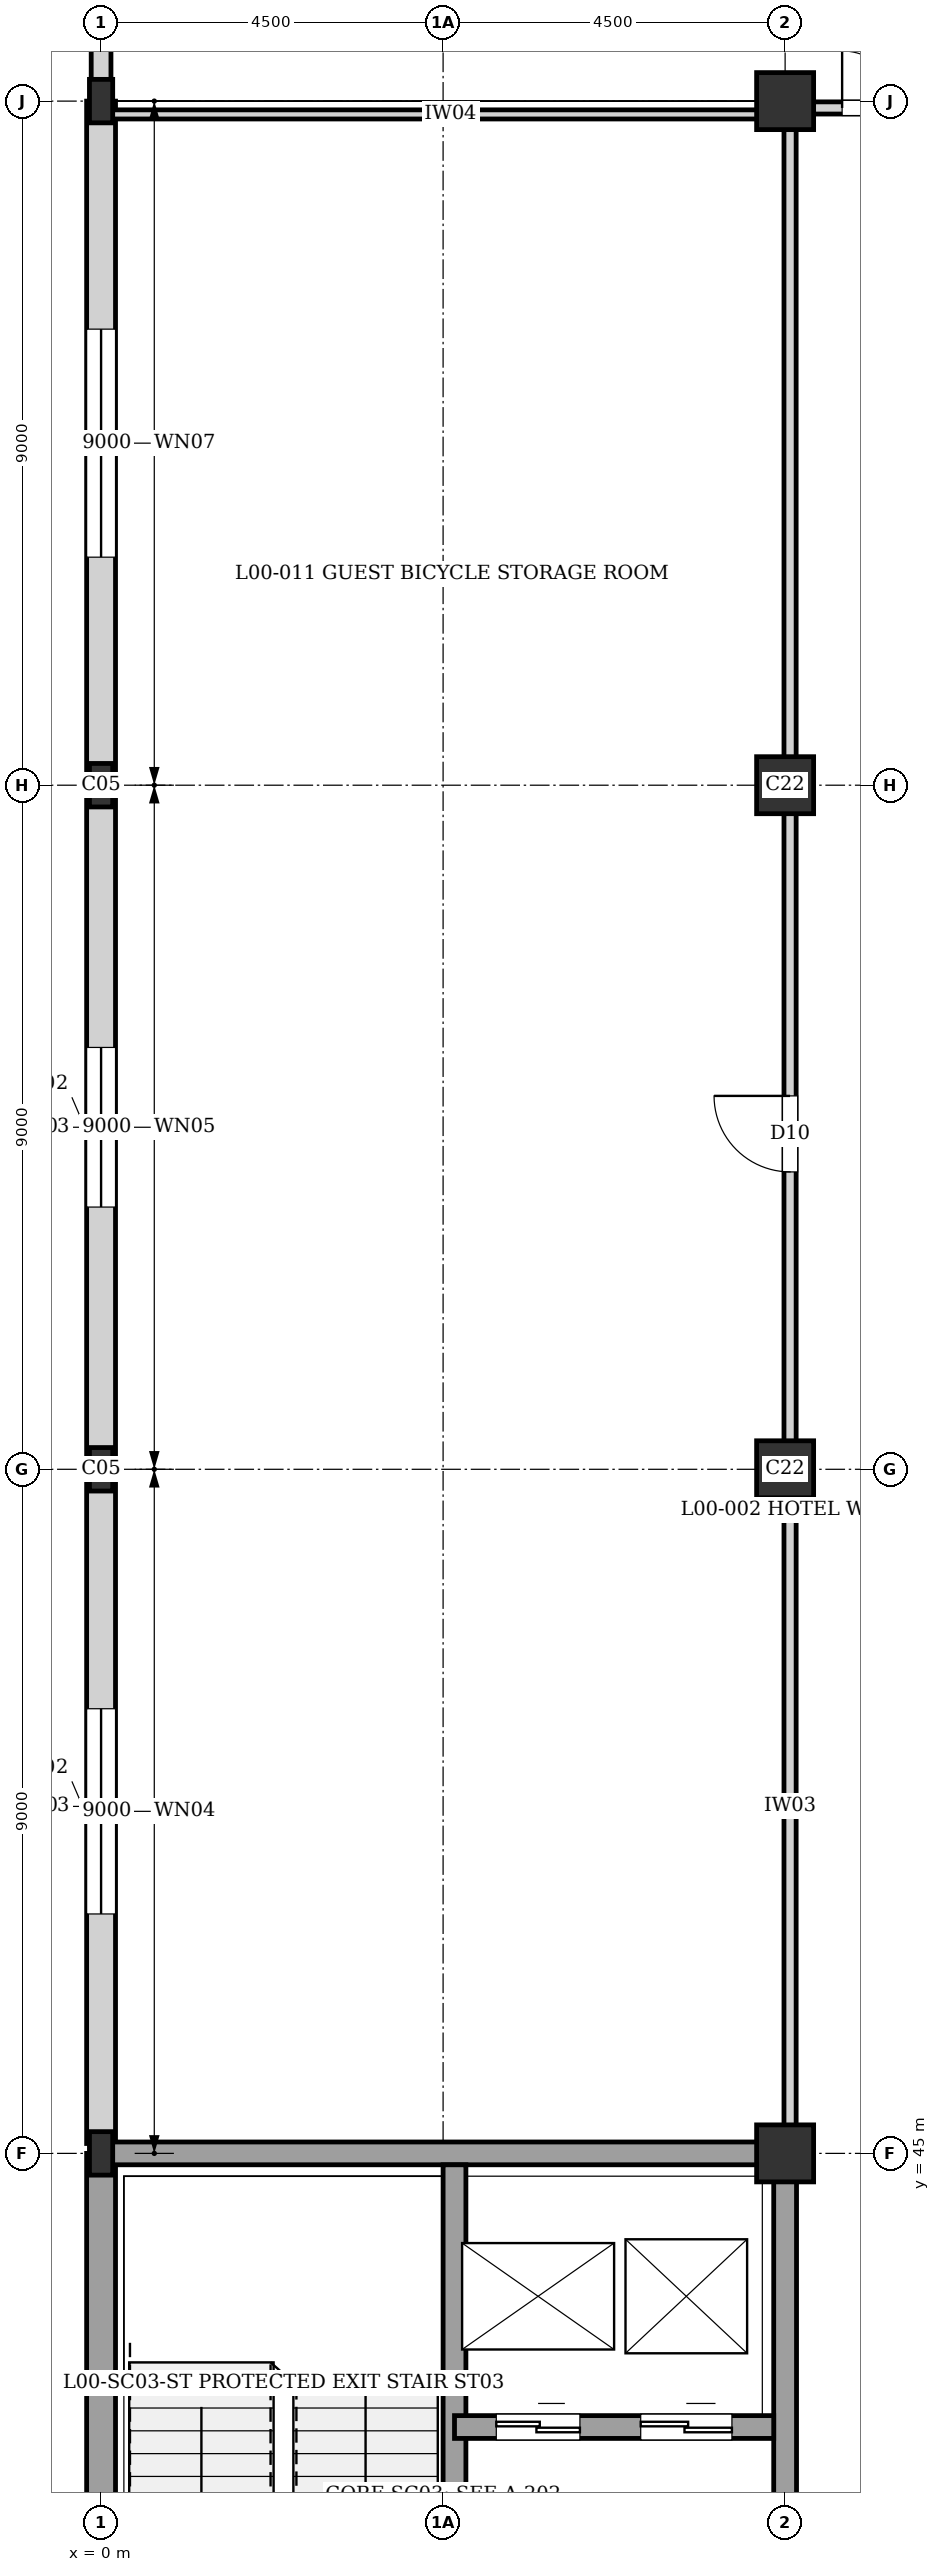
"""IFC4 building model, lengths in metres.
Left out: names, types, materials, properties, quantities, classifications, styles, units other than length and angle.
Written with IfcOpenShell. Run it as: python <this file> out.ifc"""

import sys

from ifc_helpers import new_model, si_unit, direction, frame, frame_2d, origin, origin_2d, place, context, subcontext, project, spatial, rectangle, i_section, extrude, element, fill, save


model = new_model("IFC4")
c1 = context("Model", 3, precision=1e-05, world=origin(), true_north=direction((0.0, 1.0)))
c2 = subcontext(c1, "Body", "Model", "MODEL_VIEW")
j1 = project(units=[si_unit("LENGTHUNIT", "METRE"), si_unit("PLANEANGLEUNIT", "RADIAN")], contexts=[c1])
p1 = place(None, origin())
s1 = spatial("IfcSite", under=j1, at=p1, CompositionType="ELEMENT")
p2 = place(p1, origin())
s2 = spatial("IfcBuilding", under=s1, at=p2, CompositionType="ELEMENT")
p3 = place(p2, origin())
s3 = spatial("IfcBuildingStorey", under=s2, at=p3, CompositionType="ELEMENT", Elevation=0.0)
for number, where, z_axis, x_axis in (
    (1, (0.0, 45.0, 0.0), (0.0, 0.0, 1.0), (1.0, 0.0, 0.0)),
    (2, (0.0, 54.0, 0.0), (0.0, 0.0, 1.0), (1.0, 0.0, 0.0)),
    (3, (0.0, 63.0, 0.0), (0.0, 0.0, 1.0), (1.0, 0.0, 0.0)),
    (4, (0.0, 72.0, 0.0), (0.0, 0.0, 1.0), (1.0, 0.0, 0.0)),
):
    element("IfcColumn", number, at=place(p3, frame(where, z_axis=z_axis, x_axis=x_axis)), inside=s3, PredefinedType="COLUMN", context=c2, shape_type="SweptSolid", body=[
        extrude(i_section(OverallWidth=0.306, OverallDepth=0.572, WebThickness=0.021, FlangeThickness=0.04, at=origin_2d()), origin(), (0.0, 0.0, 1.0), 4.32),
    ])
for number, where, z_axis, x_axis in (
    (5, (9.0, 45.0, 0.0), (0.0, 0.0, 1.0), (1.0, 0.0, 0.0)),
    (6, (9.0, 54.0, 0.0), (0.0, 0.0, 1.0), (1.0, 0.0, 0.0)),
    (7, (9.0, 63.0, 0.0), (0.0, 0.0, 1.0), (1.0, 0.0, 0.0)),
    (8, (9.0, 72.0, 0.0), (0.0, 0.0, 1.0), (1.0, 0.0, 0.0)),
):
    element("IfcColumn", number, at=place(p3, frame(where, z_axis=z_axis, x_axis=x_axis)), inside=s3, PredefinedType="COLUMN", context=c2, shape_type="SweptSolid", body=[
        extrude(rectangle(XDim=0.75, YDim=0.75, at=origin_2d()), origin(), (0.0, 0.0, 1.0), 4.32),
    ])
p4 = place(p3, frame((0.0, 36.0, 0.0), z_axis=(0.0, 0.0, 1.0), x_axis=(0.0, 1.0, 0.0)))
e9 = element("IfcWall", 9, at=p4, inside=s3, PredefinedType="SOLIDWALL", context=c2, shape_type="SweptSolid", body=[
    extrude(rectangle(XDim=9.0, YDim=0.38, at=frame_2d((4.5, 0.0))), origin(), (0.0, 0.0, 1.0), 4.055),
])
p5 = place(p4, frame((0.425, 0.0, 0.0)))
e10 = element("IfcOpeningElement", 10, at=p5, cuts=e9, PredefinedType="OPENING", context=c2, shape_type="SweptSolid", body=[
    extrude(rectangle(XDim=1.8, YDim=2.2, at=frame_2d((0.9, 1.1))), frame((0.0, 0.2, 0.0), z_axis=(0.0, -1.0, 0.0), x_axis=(1.0, 0.0, 0.0)), (0.0, 0.0, 1.0), 0.4),
])
p6 = place(p3, frame((0.0, 45.13, 0.0), z_axis=(0.0, 0.0, 1.0), x_axis=(0.0, 1.0, 0.0)))
e11 = element("IfcWall", 11, at=p6, inside=s3, PredefinedType="SOLIDWALL", context=c2, shape_type="SweptSolid", body=[
    extrude(rectangle(XDim=8.87, YDim=0.38, at=frame_2d((4.435, 0.0))), origin(), (0.0, 0.0, 1.0), 4.055),
])
p7 = place(p6, frame((3.02, 0.0, 0.4)))
e12 = element("IfcOpeningElement", 12, at=p7, cuts=e11, PredefinedType="OPENING", context=c2, shape_type="SweptSolid", body=[
    extrude(rectangle(XDim=2.7, YDim=1.95, at=frame_2d((1.35, 0.975))), frame((0.0, 0.2, 0.0), z_axis=(0.0, -1.0, 0.0), x_axis=(1.0, 0.0, 0.0)), (0.0, 0.0, 1.0), 0.4),
])
p8 = place(p3, frame((0.0, 54.0, 0.0), z_axis=(0.0, 0.0, 1.0), x_axis=(0.0, 1.0, 0.0)))
e13 = element("IfcWall", 13, at=p8, inside=s3, PredefinedType="SOLIDWALL", context=c2, shape_type="SweptSolid", body=[
    extrude(rectangle(XDim=9.0, YDim=0.38, at=frame_2d((4.5, 0.0))), origin(), (0.0, 0.0, 1.0), 3.755),
])
p9 = place(p8, frame((3.45, 0.0, 0.4)))
e14 = element("IfcOpeningElement", 14, at=p9, cuts=e13, PredefinedType="OPENING", context=c2, shape_type="SweptSolid", body=[
    extrude(rectangle(XDim=2.1, YDim=1.95, at=frame_2d((1.05, 0.975))), frame((0.0, 0.2, 0.0), z_axis=(0.0, -1.0, 0.0), x_axis=(1.0, 0.0, 0.0)), (0.0, 0.0, 1.0), 0.4),
])
p10 = place(p3, frame((0.0, 63.0, 0.0), z_axis=(0.0, 0.0, 1.0), x_axis=(0.0, 1.0, 0.0)))
e15 = element("IfcWall", 15, at=p10, inside=s3, PredefinedType="SOLIDWALL", context=c2, shape_type="SweptSolid", body=[
    extrude(rectangle(XDim=9.0, YDim=0.38, at=frame_2d((4.5, 0.0))), origin(), (0.0, 0.0, 1.0), 3.695),
])
p11 = place(p10, frame((3.0, 0.0, 0.4)))
e16 = element("IfcOpeningElement", 16, at=p11, cuts=e15, PredefinedType="OPENING", context=c2, shape_type="SweptSolid", body=[
    extrude(rectangle(XDim=3.0, YDim=2.2, at=frame_2d((1.5, 1.1))), frame((0.0, 0.2, 0.0), z_axis=(0.0, -1.0, 0.0), x_axis=(1.0, 0.0, 0.0)), (0.0, 0.0, 1.0), 0.4),
])
p12 = place(p3, frame((0.0, 72.0, 0.0), z_axis=(0.0, 0.0, 1.0), x_axis=(0.0, 1.0, 0.0)))
e17 = element("IfcWall", 17, at=p12, inside=s3, PredefinedType="SOLIDWALL", context=c2, shape_type="SweptSolid", body=[
    extrude(rectangle(XDim=8.87, YDim=0.26, at=frame_2d((4.435, 0.0))), origin(), (0.0, 0.0, 1.0), 3.655),
])
p13 = place(p12, frame((3.4, 0.0, 0.0)))
e18 = element("IfcOpeningElement", 18, at=p13, cuts=e17, PredefinedType="OPENING", context=c2, shape_type="SweptSolid", body=[
    extrude(rectangle(XDim=2.2, YDim=2.5, at=frame_2d((1.1, 1.25))), frame((0.0, 0.14, 0.0), z_axis=(0.0, -1.0, 0.0), x_axis=(1.0, 0.0, 0.0)), (0.0, 0.0, 1.0), 0.28),
])
p14 = place(p3, frame((9.0, 36.0, 0.0), z_axis=(0.0, 0.0, 1.0), x_axis=(0.0, 1.0, 0.0)))
e19 = element("IfcWall", 19, at=p14, inside=s3, PredefinedType="SHEAR", context=c2, shape_type="SweptSolid", body=[
    extrude(rectangle(XDim=9.0, YDim=0.3, at=frame_2d((4.5, 0.0))), origin(), (0.0, 0.0, 1.0), 4.055),
])
p15 = place(p14, frame((1.95, 0.0, 0.0)))
e20 = element("IfcOpeningElement", 20, at=p15, cuts=e19, PredefinedType="OPENING", context=c2, shape_type="SweptSolid", body=[
    extrude(rectangle(XDim=1.6, YDim=2.1, at=frame_2d((0.8, 1.05))), frame((0.0, 0.16, 0.0), z_axis=(0.0, -1.0, 0.0), x_axis=(1.0, 0.0, 0.0)), (0.0, 0.0, 1.0), 0.32),
])
p16 = place(p3, frame((0.0, 45.0, 0.0), z_axis=(0.0, 0.0, 1.0), x_axis=(1.0, 0.0, 0.0)))
e21 = element("IfcWall", 21, at=p16, inside=s3, PredefinedType="SHEAR", context=c2, shape_type="SweptSolid", body=[
    extrude(rectangle(XDim=9.0, YDim=0.3, at=frame_2d((4.5, 0.0))), origin(), (0.0, 0.0, 1.0), 4.055),
])
p17 = place(p3, frame((4.65, 36.15, 0.0), z_axis=(0.0, 0.0, 1.0), x_axis=(0.0, 1.0, 0.0)))
e22 = element("IfcWall", 22, at=p17, inside=s3, PredefinedType="SHEAR", context=c2, shape_type="SweptSolid", body=[
    extrude(rectangle(XDim=8.7, YDim=0.3, at=frame_2d((4.35, 0.0))), origin(), (0.0, 0.0, 1.0), 4.055),
])
p18 = place(p17, frame((0.35, 0.0, 0.0)))
e23 = element("IfcOpeningElement", 23, at=p18, cuts=e22, PredefinedType="OPENING", context=c2, shape_type="SweptSolid", body=[
    extrude(rectangle(XDim=1.4, YDim=2.02, at=frame_2d((0.7, 1.01))), frame((0.0, 0.16, 0.0), z_axis=(0.0, -1.0, 0.0), x_axis=(1.0, 0.0, 0.0)), (0.0, 0.0, 1.0), 0.32),
])
p19 = place(p3, frame((4.65, 41.4, 0.0), z_axis=(0.0, 0.0, 1.0), x_axis=(1.0, 0.0, 0.0)))
e24 = element("IfcWall", 24, at=p19, inside=s3, PredefinedType="SHEAR", context=c2, shape_type="SweptSolid", body=[
    extrude(rectangle(XDim=4.2, YDim=0.3, at=frame_2d((2.1, 0.0))), origin(), (0.0, 0.0, 1.0), 4.055),
])
p20 = place(p19, frame((0.55, 0.0, 0.0)))
e25 = element("IfcOpeningElement", 25, at=p20, cuts=e24, PredefinedType="OPENING", context=c2, shape_type="SweptSolid", body=[
    extrude(rectangle(XDim=1.1, YDim=2.1, at=frame_2d((0.55, 1.05))), frame((0.0, 0.16, 0.0), z_axis=(0.0, -1.0, 0.0), x_axis=(1.0, 0.0, 0.0)), (0.0, 0.0, 1.0), 0.32),
])
p21 = place(p19, frame((2.45, 0.0, 0.0)))
e26 = element("IfcOpeningElement", 26, at=p21, cuts=e24, PredefinedType="OPENING", context=c2, shape_type="SweptSolid", body=[
    extrude(rectangle(XDim=1.2, YDim=2.2, at=frame_2d((0.6, 1.1))), frame((0.0, 0.16, 0.0), z_axis=(0.0, -1.0, 0.0), x_axis=(1.0, 0.0, 0.0)), (0.0, 0.0, 1.0), 0.32),
])
p22 = place(p3, frame((0.135, 71.825, 0.0), z_axis=(0.0, 0.0, 1.0), x_axis=(1.0, 0.0, 0.0)))
e27 = element("IfcWall", 27, at=p22, inside=s3, PredefinedType="PARTITIONING", context=c2, shape_type="SweptSolid", body=[
    extrude(rectangle(XDim=8.925, YDim=0.12, at=frame_2d((4.462, 0.0))), origin(), (0.0, 0.0, 1.0), 4.055),
])
p23 = place(p3, frame((9.065, 45.155, 0.0), z_axis=(0.0, 0.0, 1.0), x_axis=(0.0, 1.0, 0.0)))
e28 = element("IfcWall", 28, at=p23, inside=s3, PredefinedType="PARTITIONING", context=c2, shape_type="SweptSolid", body=[
    extrude(rectangle(XDim=8.825, YDim=0.16, at=frame_2d((4.413, 0.0))), origin(), (0.0, 0.0, 1.0), 3.725),
])
p24 = place(p3, frame((9.22, 71.91, 0.0), z_axis=(0.0, 0.0, 1.0), x_axis=(1.0, 0.0, 0.0)))
e29 = element("IfcWall", 29, at=p24, inside=s3, PredefinedType="PARTITIONING", context=c2, shape_type="SweptSolid", body=[
    extrude(rectangle(XDim=2.56, YDim=0.16, at=frame_2d((1.28, 0.0))), origin(), (0.0, 0.0, 1.0), 3.655),
])
p25 = place(p24, frame((0.53, 0.0, 0.0)))
e30 = element("IfcOpeningElement", 30, at=p25, cuts=e29, PredefinedType="OPENING", context=c2, shape_type="SweptSolid", body=[
    extrude(rectangle(XDim=1.5, YDim=2.1, at=frame_2d((0.75, 1.05))), frame((0.0, 0.09, 0.0), z_axis=(0.0, -1.0, 0.0), x_axis=(1.0, 0.0, 0.0)), (0.0, 0.0, 1.0), 0.18),
])
p26 = place(p3, frame((9.065, 53.98, 0.0), z_axis=(0.0, 0.0, 1.0), x_axis=(0.0, 1.0, 0.0)))
e31 = element("IfcWall", 31, at=p26, inside=s3, PredefinedType="PARTITIONING", context=c2, shape_type="SweptSolid", body=[
    extrude(rectangle(XDim=9.0, YDim=0.16, at=frame_2d((4.5, 0.0))), origin(), (0.0, 0.0, 1.0), 3.665),
])
p27 = place(p26, frame((3.933, 0.0, 0.0)))
e32 = element("IfcOpeningElement", 32, at=p27, cuts=e31, PredefinedType="OPENING", context=c2, shape_type="SweptSolid", body=[
    extrude(rectangle(XDim=1.0, YDim=2.1, at=frame_2d((0.5, 1.05))), frame((0.0, 0.09, 0.0), z_axis=(0.0, -1.0, 0.0), x_axis=(1.0, 0.0, 0.0)), (0.0, 0.0, 1.0), 0.18),
])
p28 = place(p3, frame((9.065, 62.98, 0.0), z_axis=(0.0, 0.0, 1.0), x_axis=(0.0, 1.0, 0.0)))
e33 = element("IfcWall", 33, at=p28, inside=s3, PredefinedType="PARTITIONING", context=c2, shape_type="SweptSolid", body=[
    extrude(rectangle(XDim=8.69, YDim=0.16, at=frame_2d((4.345, 0.0))), origin(), (0.0, 0.0, 1.0), 3.615),
])
p29 = place(p7, origin())
e34 = element("IfcWindow", 34, at=p29, inside=s3, PartitioningType="SINGLE_PANEL", PredefinedType="WINDOW", context=c2, shape_type="SweptSolid", body=[
    extrude(rectangle(XDim=2.7, YDim=1.95, at=frame_2d((1.35, 0.975))), frame((0.0, 0.03, 0.0), z_axis=(0.0, -1.0, 0.0), x_axis=(1.0, 0.0, 0.0)), (0.0, 0.0, 1.0), 0.06),
])
fill(e12, e34)
p30 = place(p9, origin())
e35 = element("IfcWindow", 35, at=p30, inside=s3, PartitioningType="SINGLE_PANEL", PredefinedType="WINDOW", context=c2, shape_type="SweptSolid", body=[
    extrude(rectangle(XDim=2.1, YDim=1.95, at=frame_2d((1.05, 0.975))), frame((0.0, 0.03, 0.0), z_axis=(0.0, -1.0, 0.0), x_axis=(1.0, 0.0, 0.0)), (0.0, 0.0, 1.0), 0.06),
])
fill(e14, e35)
p31 = place(p11, origin())
e36 = element("IfcWindow", 36, at=p31, inside=s3, PartitioningType="SINGLE_PANEL", PredefinedType="WINDOW", context=c2, shape_type="SweptSolid", body=[
    extrude(rectangle(XDim=3.0, YDim=2.2, at=frame_2d((1.5, 1.1))), frame((0.0, 0.03, 0.0), z_axis=(0.0, -1.0, 0.0), x_axis=(1.0, 0.0, 0.0)), (0.0, 0.0, 1.0), 0.06),
])
fill(e16, e36)
p32 = place(p20, origin())
e37 = element("IfcDoor", 37, at=p32, inside=s3, OperationType="DOUBLE_DOOR_SLIDING", PredefinedType="DOOR", context=c2, shape_type="SweptSolid", body=[
    extrude(rectangle(XDim=1.1, YDim=2.1, at=frame_2d((0.55, 1.05))), frame((0.0, 0.025, 0.0), z_axis=(0.0, -1.0, 0.0), x_axis=(1.0, 0.0, 0.0)), (0.0, 0.0, 1.0), 0.05),
])
fill(e25, e37)
p33 = place(p21, origin())
e38 = element("IfcDoor", 38, at=p33, inside=s3, OperationType="DOUBLE_DOOR_SLIDING", PredefinedType="DOOR", context=c2, shape_type="SweptSolid", body=[
    extrude(rectangle(XDim=1.2, YDim=2.2, at=frame_2d((0.6, 1.1))), frame((0.0, 0.025, 0.0), z_axis=(0.0, -1.0, 0.0), x_axis=(1.0, 0.0, 0.0)), (0.0, 0.0, 1.0), 0.05),
])
fill(e26, e38)
p34 = place(p27, origin())
e39 = element("IfcDoor", 39, at=p34, inside=s3, OperationType="SINGLE_SWING_RIGHT", PredefinedType="DOOR", context=c2, shape_type="SweptSolid", body=[
    extrude(rectangle(XDim=1.0, YDim=2.1, at=frame_2d((0.5, 1.05))), frame((0.0, 0.025, 0.0), z_axis=(0.0, -1.0, 0.0), x_axis=(1.0, 0.0, 0.0)), (0.0, 0.0, 1.0), 0.05),
])
fill(e32, e39)
p35 = place(p25, origin())
e40 = element("IfcDoor", 40, at=p35, inside=s3, OperationType="DOUBLE_DOOR_SINGLE_SWING", PredefinedType="DOOR", context=c2, shape_type="SweptSolid", body=[
    extrude(rectangle(XDim=1.5, YDim=2.1, at=frame_2d((0.75, 1.05))), frame((0.0, 0.025, 0.0), z_axis=(0.0, -1.0, 0.0), x_axis=(1.0, 0.0, 0.0)), (0.0, 0.0, 1.0), 0.05),
])
fill(e30, e40)
save(model, sys.argv[1])
